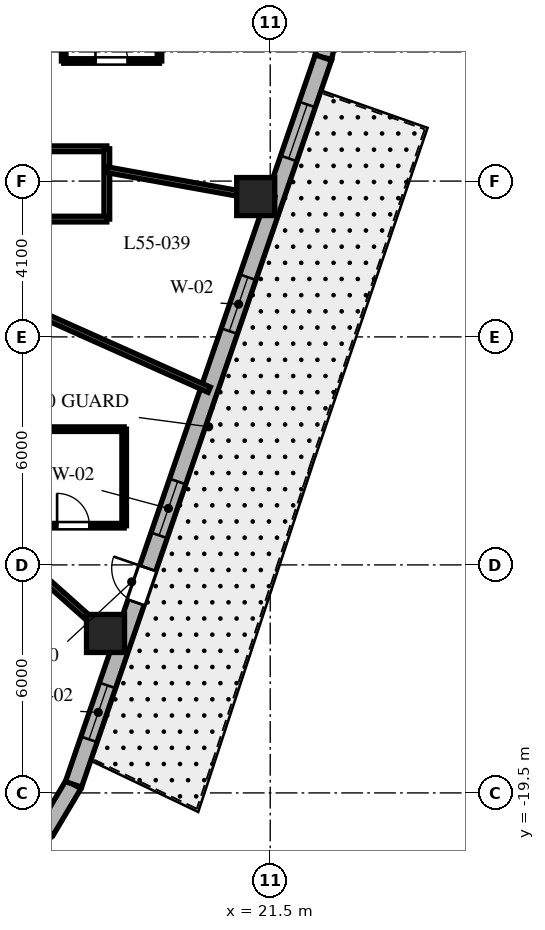
"""IFC4 building model, lengths in metres.
Left out: names, types, materials, properties, quantities, classifications, styles, units other than length and angle.
Written with IfcOpenShell. Run it as: python <this file> out.ifc"""

import sys

from ifc_helpers import new_model, si_unit, direction, frame, frame_2d, origin, origin_2d, place, context, subcontext, project, spatial, rectangle, extrude, element, fill, save


model = new_model("IFC4")
c1 = context("Model", 3, precision=1e-05, world=origin(), true_north=direction((0.0, 1.0)))
c2 = subcontext(c1, "Body", "Model", "MODEL_VIEW")
j1 = project(units=[si_unit("LENGTHUNIT", "METRE"), si_unit("PLANEANGLEUNIT", "RADIAN")], contexts=[c1])
p1 = place(None, origin())
s1 = spatial("IfcSite", under=j1, at=p1, CompositionType="ELEMENT")
p2 = place(p1, origin())
s2 = spatial("IfcBuilding", under=s1, at=p2, CompositionType="ELEMENT")
p3 = place(p2, frame((0.0, 0.0, 221.7)))
s3 = spatial("IfcBuildingStorey", under=s2, at=p3, CompositionType="ELEMENT", Elevation=221.7)
for number, where, z_axis, x_axis in (
    (1, (17.166, -15.304, 0.0), (0.0, 0.0, 1.0), (1.0, 0.0, 0.0)),
    (2, (21.118, -3.807, 0.0), (0.0, 0.0, 1.0), (1.0, 0.0, 0.0)),
):
    element("IfcColumn", number, at=place(p3, frame(where, z_axis=z_axis, x_axis=x_axis)), inside=s3, PredefinedType="COLUMN", context=c2, shape_type="SweptSolid", body=[
        extrude(rectangle(XDim=1.0, YDim=1.0, at=origin_2d()), origin(), (0.0, 0.0, 1.0), 3.8),
    ])
p4 = place(p3, frame((15.604, -20.483, 0.0), z_axis=(0.0, 0.0, 1.0), x_axis=(0.512222149036, 0.858852996756, 0.0)))
e3 = element("IfcWall", 3, at=p4, inside=s3, PredefinedType="SOLIDWALL", context=c2, shape_type="SweptSolid", body=[
    extrude(rectangle(XDim=1.406, YDim=0.45, at=frame_2d((0.703, 0.0))), origin(), (0.0, 0.0, 1.0), 3.5),
])
p5 = place(p3, frame((22.898, -0.15, 0.0), z_axis=(0.0, 0.0, 1.0), x_axis=(0.199055826889, 0.979988151858, 0.0)))
e4 = element("IfcWall", 4, at=p5, inside=s3, PredefinedType="SOLIDWALL", context=c2, shape_type="SweptSolid", body=[
    extrude(rectangle(XDim=0.894, YDim=0.45, at=frame_2d((0.447, 0.0))), origin(), (0.0, 0.0, 1.0), 3.5),
])
p6 = place(p3, frame((16.324, -19.275, 0.0), z_axis=(0.0, 0.0, 1.0), x_axis=(0.325083142304, 0.945685439557, 0.0)))
e5 = element("IfcWall", 5, at=p6, inside=s3, PredefinedType="SOLIDWALL", context=c2, shape_type="SweptSolid", body=[
    extrude(rectangle(XDim=20.224, YDim=0.45, at=frame_2d((10.112, 0.0))), origin(), (0.0, 0.0, 1.0), 3.5),
])
p7 = place(p6, frame((5.062, 0.0, 0.0)))
e6 = element("IfcOpeningElement", 6, at=p7, cuts=e5, PredefinedType="OPENING", context=c2, shape_type="SweptSolid", body=[
    extrude(rectangle(XDim=0.95, YDim=2.15, at=frame_2d((0.475, 1.075))), frame((0.0, 0.235, 0.0), z_axis=(0.0, -1.0, 0.0), x_axis=(1.0, 0.0, 0.0)), (0.0, 0.0, 1.0), 0.47),
])
p8 = place(p6, frame((1.253, 0.0, 0.8)))
e7 = element("IfcOpeningElement", 7, at=p8, cuts=e5, PredefinedType="OPENING", context=c2, shape_type="SweptSolid", body=[
    extrude(rectangle(XDim=1.5, YDim=1.8, at=frame_2d((0.75, 0.9))), frame((0.0, 0.235, 0.0), z_axis=(0.0, -1.0, 0.0), x_axis=(1.0, 0.0, 0.0)), (0.0, 0.0, 1.0), 0.47),
])
p9 = place(p6, frame((6.929, 0.0, 0.8)))
e8 = element("IfcOpeningElement", 8, at=p9, cuts=e5, PredefinedType="OPENING", context=c2, shape_type="SweptSolid", body=[
    extrude(rectangle(XDim=1.5, YDim=1.8, at=frame_2d((0.75, 0.9))), frame((0.0, 0.235, 0.0), z_axis=(0.0, -1.0, 0.0), x_axis=(1.0, 0.0, 0.0)), (0.0, 0.0, 1.0), 0.47),
])
p10 = place(p6, frame((12.612, 0.0, 0.8)))
e9 = element("IfcOpeningElement", 9, at=p10, cuts=e5, PredefinedType="OPENING", context=c2, shape_type="SweptSolid", body=[
    extrude(rectangle(XDim=1.5, YDim=1.8, at=frame_2d((0.75, 0.9))), frame((0.0, 0.235, 0.0), z_axis=(0.0, -1.0, 0.0), x_axis=(1.0, 0.0, 0.0)), (0.0, 0.0, 1.0), 0.47),
])
p11 = place(p6, frame((17.418, 0.0, 0.8)))
e10 = element("IfcOpeningElement", 10, at=p11, cuts=e5, PredefinedType="OPENING", context=c2, shape_type="SweptSolid", body=[
    extrude(rectangle(XDim=1.5, YDim=1.8, at=frame_2d((0.75, 0.9))), frame((0.0, 0.235, 0.0), z_axis=(0.0, -1.0, 0.0), x_axis=(1.0, 0.0, 0.0)), (0.0, 0.0, 1.0), 0.47),
])
p12 = place(p3, frame((11.35, -2.55, 0.0), z_axis=(0.0, 0.0, 1.0), x_axis=(1.0, 0.0, 0.0)))
e11 = element("IfcWall", 11, at=p12, inside=s3, PredefinedType="PARTITIONING", context=c2, shape_type="SweptSolid", body=[
    extrude(rectangle(XDim=5.85, YDim=0.15, at=frame_2d((2.925, 0.0))), origin(), (0.0, 0.0, 1.0), 2.94),
])
p13 = place(p3, frame((17.2, -2.55, 0.0), z_axis=(0.0, 0.0, 1.0), x_axis=(0.0, -1.0, 0.0)))
e12 = element("IfcWall", 12, at=p13, inside=s3, PredefinedType="PARTITIONING", context=c2, shape_type="SweptSolid", body=[
    extrude(rectangle(XDim=1.85, YDim=0.15, at=frame_2d((0.925, 0.0))), origin(), (0.0, 0.0, 1.0), 2.94),
])
p14 = place(p3, frame((17.2, -4.4, 0.0), z_axis=(0.0, 0.0, 1.0), x_axis=(-1.0, 0.0, 0.0)))
e13 = element("IfcWall", 13, at=p14, inside=s3, PredefinedType="PARTITIONING", context=c2, shape_type="SweptSolid", body=[
    extrude(rectangle(XDim=5.85, YDim=0.15, at=frame_2d((2.925, 0.0))), origin(), (0.0, 0.0, 1.0), 2.94),
])
p15 = place(p14, frame((2.475, 0.0, 0.0)))
e14 = element("IfcOpeningElement", 14, at=p15, cuts=e13, PredefinedType="OPENING", context=c2, shape_type="SweptSolid", body=[
    extrude(rectangle(XDim=0.9, YDim=2.03, at=frame_2d((0.45, 1.015))), frame((0.0, 0.085, 0.0), z_axis=(0.0, -1.0, 0.0), x_axis=(1.0, 0.0, 0.0)), (0.0, 0.0, 1.0), 0.17),
])
p16 = place(p3, frame((11.048, -9.85, 0.0), z_axis=(0.0, 0.0, 1.0), x_axis=(0.746444434655, -0.665447748492, 0.0)))
e15 = element("IfcWall", 15, at=p16, inside=s3, PredefinedType="PARTITIONING", context=c2, shape_type="SweptSolid", body=[
    extrude(rectangle(XDim=8.732, YDim=0.15, at=frame_2d((4.366, 0.0))), origin(), (0.0, 0.0, 1.0), 2.74),
])
p17 = place(p3, frame((11.35, -5.072, 0.0), z_axis=(0.0, 0.0, 1.0), x_axis=(0.912980177983, -0.408003914944, 0.0)))
e16 = element("IfcWall", 16, at=p17, inside=s3, PredefinedType="PARTITIONING", context=c2, shape_type="SweptSolid", body=[
    extrude(rectangle(XDim=9.358, YDim=0.15, at=frame_2d((4.679, 0.0))), origin(), (0.0, 0.0, 1.0), 2.74),
])
p18 = place(p3, frame((17.2, -3.101, 0.0), z_axis=(0.0, 0.0, 1.0), x_axis=(0.98413465883, -0.177423147559, 0.0)))
e17 = element("IfcWall", 17, at=p18, inside=s3, PredefinedType="PARTITIONING", context=c2, shape_type="SweptSolid", body=[
    extrude(rectangle(XDim=4.482, YDim=0.15, at=frame_2d((2.241, 0.0))), origin(), (0.0, 0.0, 1.0), 2.74),
])
p19 = place(p3, frame((14.977, -12.468, 0.0), z_axis=(0.0, 0.0, 1.0), x_axis=(1.0, 0.0, 0.0)))
e18 = element("IfcWall", 18, at=p19, inside=s3, PredefinedType="PARTITIONING", context=c2, shape_type="SweptSolid", body=[
    extrude(rectangle(XDim=2.68, YDim=0.12, at=frame_2d((1.34, 0.0))), origin(), (0.0, 0.0, 1.0), 3.5),
])
p20 = place(p19, frame((0.915, 0.0, 0.0)))
e19 = element("IfcOpeningElement", 19, at=p20, cuts=e18, PredefinedType="OPENING", context=c2, shape_type="SweptSolid", body=[
    extrude(rectangle(XDim=0.85, YDim=2.03, at=frame_2d((0.425, 1.015))), frame((0.0, 0.07, 0.0), z_axis=(0.0, -1.0, 0.0), x_axis=(1.0, 0.0, 0.0)), (0.0, 0.0, 1.0), 0.14),
])
p21 = place(p3, frame((17.657, -12.468, 0.0), z_axis=(0.0, 0.0, 1.0), x_axis=(0.0, 1.0, 0.0)))
e20 = element("IfcWall", 20, at=p21, inside=s3, PredefinedType="PARTITIONING", context=c2, shape_type="SweptSolid", body=[
    extrude(rectangle(XDim=2.54, YDim=0.12, at=frame_2d((1.27, 0.0))), origin(), (0.0, 0.0, 1.0), 3.5),
])
p22 = place(p3, frame((17.657, -9.928, 0.0), z_axis=(0.0, 0.0, 1.0), x_axis=(-1.0, 0.0, 0.0)))
e21 = element("IfcWall", 21, at=p22, inside=s3, PredefinedType="PARTITIONING", context=c2, shape_type="SweptSolid", body=[
    extrude(rectangle(XDim=2.68, YDim=0.12, at=frame_2d((1.34, 0.0))), origin(), (0.0, 0.0, 1.0), 3.073),
])
p23 = place(p3, frame((16.066, -0.239, 0.0), z_axis=(0.0, 0.0, 1.0), x_axis=(1.0, 0.0, 0.0)))
e22 = element("IfcWall", 22, at=p23, inside=s3, PredefinedType="PARTITIONING", context=c2, shape_type="SweptSolid", body=[
    extrude(rectangle(XDim=2.52, YDim=0.12, at=frame_2d((1.26, 0.0))), origin(), (0.0, 0.0, 1.0), 2.94),
])
p24 = place(p23, frame((0.835, 0.0, 0.0)))
e23 = element("IfcOpeningElement", 23, at=p24, cuts=e22, PredefinedType="OPENING", context=c2, shape_type="SweptSolid", body=[
    extrude(rectangle(XDim=0.85, YDim=2.03, at=frame_2d((0.425, 1.015))), frame((0.0, 0.07, 0.0), z_axis=(0.0, -1.0, 0.0), x_axis=(1.0, 0.0, 0.0)), (0.0, 0.0, 1.0), 0.14),
])
for number, where, z_axis, x_axis in (
    (24, (18.586, -0.239, 0.0), (0.0, 0.0, 1.0), (0.0, 1.0, 0.0)),
    (25, (16.066, 2.441, 0.0), (0.0, 0.0, 1.0), (0.0, -1.0, 0.0)),
):
    element("IfcWall", number, at=place(p3, frame(where, z_axis=z_axis, x_axis=x_axis)), inside=s3, PredefinedType="PARTITIONING", context=c2, shape_type="SweptSolid", body=[
        extrude(rectangle(XDim=2.68, YDim=0.12, at=frame_2d((1.34, 0.0))), origin(), (0.0, 0.0, 1.0), 3.5),
    ])
p25 = place(p7, origin())
e26 = element("IfcDoor", 26, at=p25, inside=s3, OperationType="SINGLE_SWING_RIGHT", PredefinedType="DOOR", context=c2, shape_type="SweptSolid", body=[
    extrude(rectangle(XDim=0.95, YDim=2.15, at=frame_2d((0.475, 1.075))), frame((0.0, 0.025, 0.0), z_axis=(0.0, -1.0, 0.0), x_axis=(1.0, 0.0, 0.0)), (0.0, 0.0, 1.0), 0.05),
])
fill(e6, e26)
p26 = place(p8, origin())
e27 = element("IfcWindow", 27, at=p26, inside=s3, PartitioningType="SINGLE_PANEL", PredefinedType="WINDOW", context=c2, shape_type="SweptSolid", body=[
    extrude(rectangle(XDim=1.5, YDim=1.8, at=frame_2d((0.75, 0.9))), frame((0.0, 0.03, 0.0), z_axis=(0.0, -1.0, 0.0), x_axis=(1.0, 0.0, 0.0)), (0.0, 0.0, 1.0), 0.06),
])
fill(e7, e27)
p27 = place(p9, origin())
e28 = element("IfcWindow", 28, at=p27, inside=s3, PartitioningType="SINGLE_PANEL", PredefinedType="WINDOW", context=c2, shape_type="SweptSolid", body=[
    extrude(rectangle(XDim=1.5, YDim=1.8, at=frame_2d((0.75, 0.9))), frame((0.0, 0.03, 0.0), z_axis=(0.0, -1.0, 0.0), x_axis=(1.0, 0.0, 0.0)), (0.0, 0.0, 1.0), 0.06),
])
fill(e8, e28)
p28 = place(p10, origin())
e29 = element("IfcWindow", 29, at=p28, inside=s3, PartitioningType="SINGLE_PANEL", PredefinedType="WINDOW", context=c2, shape_type="SweptSolid", body=[
    extrude(rectangle(XDim=1.5, YDim=1.8, at=frame_2d((0.75, 0.9))), frame((0.0, 0.03, 0.0), z_axis=(0.0, -1.0, 0.0), x_axis=(1.0, 0.0, 0.0)), (0.0, 0.0, 1.0), 0.06),
])
fill(e9, e29)
p29 = place(p11, origin())
e30 = element("IfcWindow", 30, at=p29, inside=s3, PartitioningType="SINGLE_PANEL", PredefinedType="WINDOW", context=c2, shape_type="SweptSolid", body=[
    extrude(rectangle(XDim=1.5, YDim=1.8, at=frame_2d((0.75, 0.9))), frame((0.0, 0.03, 0.0), z_axis=(0.0, -1.0, 0.0), x_axis=(1.0, 0.0, 0.0)), (0.0, 0.0, 1.0), 0.06),
])
fill(e10, e30)
p30 = place(p20, origin())
e31 = element("IfcDoor", 31, at=p30, inside=s3, OperationType="SINGLE_SWING_LEFT", PredefinedType="DOOR", context=c2, shape_type="SweptSolid", body=[
    extrude(rectangle(XDim=0.85, YDim=2.03, at=frame_2d((0.425, 1.015))), frame((0.0, 0.025, 0.0), z_axis=(0.0, -1.0, 0.0), x_axis=(1.0, 0.0, 0.0)), (0.0, 0.0, 1.0), 0.05),
])
fill(e19, e31)
p31 = place(p24, origin())
e32 = element("IfcDoor", 32, at=p31, inside=s3, OperationType="SINGLE_SWING_LEFT", PredefinedType="DOOR", context=c2, shape_type="SweptSolid", body=[
    extrude(rectangle(XDim=0.85, YDim=2.03, at=frame_2d((0.425, 1.015))), frame((0.0, 0.025, 0.0), z_axis=(0.0, -1.0, 0.0), x_axis=(1.0, 0.0, 0.0)), (0.0, 0.0, 1.0), 0.05),
])
fill(e23, e32)
save(model, sys.argv[1])
